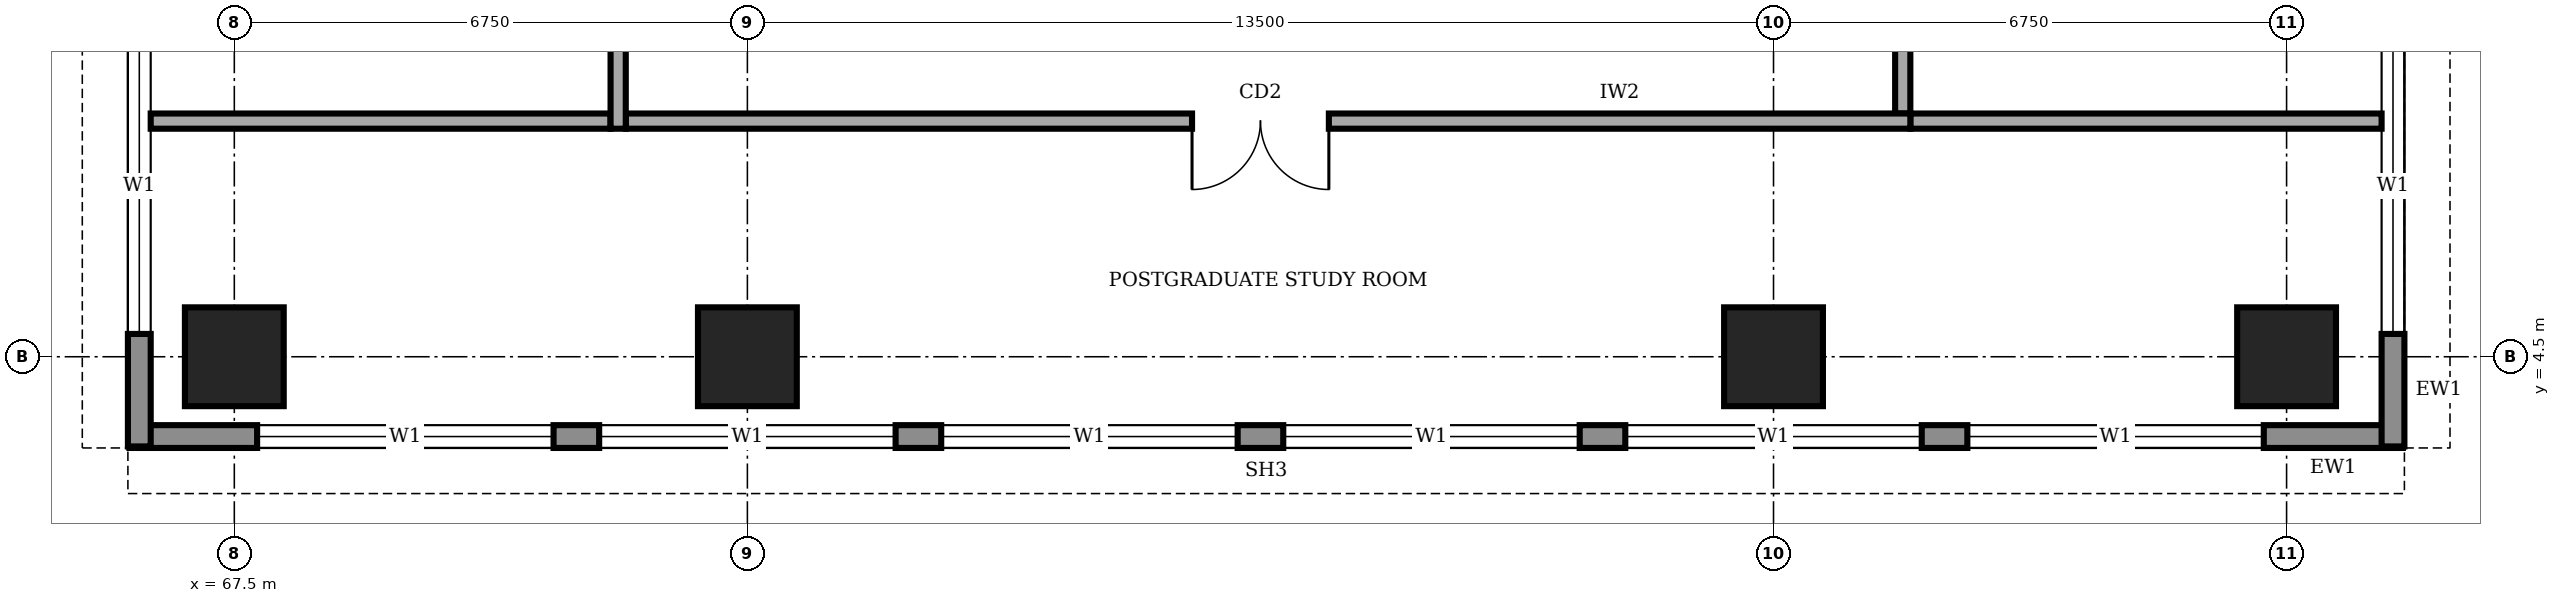
"""IFC4 building model, lengths in metres.
Left out: names, types, materials, properties, quantities, classifications, styles, units other than length and angle.
Written with IfcOpenShell. Run it as: python <this file> out.ifc"""

import sys

from ifc_helpers import new_model, si_unit, direction, frame, frame_2d, origin, origin_2d, place, context, subcontext, project, spatial, rectangle, extrude, element, fill, save


model = new_model("IFC4")
c1 = context("Model", 3, precision=1e-05, world=origin(), true_north=direction((0.0, 1.0)))
c2 = subcontext(c1, "Body", "Model", "MODEL_VIEW")
j1 = project(units=[si_unit("LENGTHUNIT", "METRE"), si_unit("PLANEANGLEUNIT", "RADIAN")], contexts=[c1])
p1 = place(None, origin())
s1 = spatial("IfcSite", under=j1, at=p1, CompositionType="ELEMENT")
p2 = place(p1, origin())
s2 = spatial("IfcBuilding", under=s1, at=p2, CompositionType="ELEMENT")
p3 = place(p2, frame((0.0, 0.0, 205.0)))
s3 = spatial("IfcBuildingStorey", under=s2, at=p3, CompositionType="ELEMENT", Elevation=205.0)
for number, where, z_axis, x_axis in (
    (1, (67.5, 4.5, 0.0), (0.0, 0.0, 1.0), (1.0, 0.0, 0.0)),
    (2, (74.25, 4.5, 0.0), (0.0, 0.0, 1.0), (1.0, 0.0, 0.0)),
    (3, (87.75, 4.5, 0.0), (0.0, 0.0, 1.0), (1.0, 0.0, 0.0)),
    (4, (94.5, 4.5, 0.0), (0.0, 0.0, 1.0), (1.0, 0.0, 0.0)),
):
    element("IfcColumn", number, at=place(p3, frame(where, z_axis=z_axis, x_axis=x_axis)), inside=s3, PredefinedType="COLUMN", context=c2, shape_type="SweptSolid", body=[
        extrude(rectangle(XDim=1.3, YDim=1.3, at=origin_2d()), origin(), (0.0, 0.0, 1.0), 4.0),
    ])
p4 = place(p3, frame((66.12, 3.45, 0.0), z_axis=(0.0, 0.0, 1.0), x_axis=(1.0, 0.0, 0.0)))
e5 = element("IfcWall", 5, at=p4, inside=s3, PredefinedType="STANDARD", context=c2, shape_type="SweptSolid", body=[
    extrude(rectangle(XDim=29.91, YDim=0.3, at=frame_2d((14.955, 0.0))), origin(), (0.0, 0.0, 1.0), 3.75),
])
p5 = place(p4, frame((1.68, 0.0, 0.9)))
e6 = element("IfcOpeningElement", 6, at=p5, cuts=e5, PredefinedType="OPENING", context=c2, shape_type="SweptSolid", body=[
    extrude(rectangle(XDim=3.9, YDim=2.2, at=frame_2d((1.95, 1.1))), frame((0.0, 0.16, 0.0), z_axis=(0.0, -1.0, 0.0), x_axis=(1.0, 0.0, 0.0)), (0.0, 0.0, 1.0), 0.32),
])
p6 = place(p4, frame((6.18, 0.0, 0.9)))
e7 = element("IfcOpeningElement", 7, at=p6, cuts=e5, PredefinedType="OPENING", context=c2, shape_type="SweptSolid", body=[
    extrude(rectangle(XDim=3.9, YDim=2.2, at=frame_2d((1.95, 1.1))), frame((0.0, 0.16, 0.0), z_axis=(0.0, -1.0, 0.0), x_axis=(1.0, 0.0, 0.0)), (0.0, 0.0, 1.0), 0.32),
])
p7 = place(p4, frame((10.68, 0.0, 0.9)))
e8 = element("IfcOpeningElement", 8, at=p7, cuts=e5, PredefinedType="OPENING", context=c2, shape_type="SweptSolid", body=[
    extrude(rectangle(XDim=3.9, YDim=2.2, at=frame_2d((1.95, 1.1))), frame((0.0, 0.16, 0.0), z_axis=(0.0, -1.0, 0.0), x_axis=(1.0, 0.0, 0.0)), (0.0, 0.0, 1.0), 0.32),
])
p8 = place(p4, frame((15.18, 0.0, 0.9)))
e9 = element("IfcOpeningElement", 9, at=p8, cuts=e5, PredefinedType="OPENING", context=c2, shape_type="SweptSolid", body=[
    extrude(rectangle(XDim=3.9, YDim=2.2, at=frame_2d((1.95, 1.1))), frame((0.0, 0.16, 0.0), z_axis=(0.0, -1.0, 0.0), x_axis=(1.0, 0.0, 0.0)), (0.0, 0.0, 1.0), 0.32),
])
p9 = place(p4, frame((19.68, 0.0, 0.9)))
e10 = element("IfcOpeningElement", 10, at=p9, cuts=e5, PredefinedType="OPENING", context=c2, shape_type="SweptSolid", body=[
    extrude(rectangle(XDim=3.9, YDim=2.2, at=frame_2d((1.95, 1.1))), frame((0.0, 0.16, 0.0), z_axis=(0.0, -1.0, 0.0), x_axis=(1.0, 0.0, 0.0)), (0.0, 0.0, 1.0), 0.32),
])
p10 = place(p4, frame((24.18, 0.0, 0.9)))
e11 = element("IfcOpeningElement", 11, at=p10, cuts=e5, PredefinedType="OPENING", context=c2, shape_type="SweptSolid", body=[
    extrude(rectangle(XDim=3.9, YDim=2.2, at=frame_2d((1.95, 1.1))), frame((0.0, 0.16, 0.0), z_axis=(0.0, -1.0, 0.0), x_axis=(1.0, 0.0, 0.0)), (0.0, 0.0, 1.0), 0.32),
])
p11 = place(p3, frame((95.9, 3.32, 0.0), z_axis=(0.0, 0.0, 1.0), x_axis=(0.0, 1.0, 0.0)))
e12 = element("IfcWall", 12, at=p11, inside=s3, PredefinedType="STANDARD", context=c2, shape_type="SweptSolid", body=[
    extrude(rectangle(XDim=33.86, YDim=0.3, at=frame_2d((16.93, 0.0))), origin(), (0.0, 0.0, 1.0), 3.75),
])
p12 = place(p11, frame((1.48, 0.0, 0.9)))
e13 = element("IfcOpeningElement", 13, at=p12, cuts=e12, PredefinedType="OPENING", context=c2, shape_type="SweptSolid", body=[
    extrude(rectangle(XDim=3.9, YDim=2.2, at=frame_2d((1.95, 1.1))), frame((0.0, 0.16, 0.0), z_axis=(0.0, -1.0, 0.0), x_axis=(1.0, 0.0, 0.0)), (0.0, 0.0, 1.0), 0.32),
])
p13 = place(p11, frame((5.98, 0.0, 0.9)))
e14 = element("IfcOpeningElement", 14, at=p13, cuts=e12, PredefinedType="OPENING", context=c2, shape_type="SweptSolid", body=[
    extrude(rectangle(XDim=3.9, YDim=2.2, at=frame_2d((1.95, 1.1))), frame((0.0, 0.16, 0.0), z_axis=(0.0, -1.0, 0.0), x_axis=(1.0, 0.0, 0.0)), (0.0, 0.0, 1.0), 0.32),
])
p14 = place(p11, frame((10.48, 0.0, 0.9)))
e15 = element("IfcOpeningElement", 15, at=p14, cuts=e12, PredefinedType="OPENING", context=c2, shape_type="SweptSolid", body=[
    extrude(rectangle(XDim=3.9, YDim=2.2, at=frame_2d((1.95, 1.1))), frame((0.0, 0.16, 0.0), z_axis=(0.0, -1.0, 0.0), x_axis=(1.0, 0.0, 0.0)), (0.0, 0.0, 1.0), 0.32),
])
p15 = place(p11, frame((14.98, 0.0, 0.9)))
e16 = element("IfcOpeningElement", 16, at=p15, cuts=e12, PredefinedType="OPENING", context=c2, shape_type="SweptSolid", body=[
    extrude(rectangle(XDim=3.9, YDim=2.2, at=frame_2d((1.95, 1.1))), frame((0.0, 0.16, 0.0), z_axis=(0.0, -1.0, 0.0), x_axis=(1.0, 0.0, 0.0)), (0.0, 0.0, 1.0), 0.32),
])
p16 = place(p11, frame((19.48, 0.0, 0.9)))
e17 = element("IfcOpeningElement", 17, at=p16, cuts=e12, PredefinedType="OPENING", context=c2, shape_type="SweptSolid", body=[
    extrude(rectangle(XDim=3.9, YDim=2.2, at=frame_2d((1.95, 1.1))), frame((0.0, 0.16, 0.0), z_axis=(0.0, -1.0, 0.0), x_axis=(1.0, 0.0, 0.0)), (0.0, 0.0, 1.0), 0.32),
])
p17 = place(p11, frame((23.98, 0.0, 0.9)))
e18 = element("IfcOpeningElement", 18, at=p17, cuts=e12, PredefinedType="OPENING", context=c2, shape_type="SweptSolid", body=[
    extrude(rectangle(XDim=3.9, YDim=2.2, at=frame_2d((1.95, 1.1))), frame((0.0, 0.16, 0.0), z_axis=(0.0, -1.0, 0.0), x_axis=(1.0, 0.0, 0.0)), (0.0, 0.0, 1.0), 0.32),
])
p18 = place(p11, frame((28.48, 0.0, 0.9)))
e19 = element("IfcOpeningElement", 19, at=p18, cuts=e12, PredefinedType="OPENING", context=c2, shape_type="SweptSolid", body=[
    extrude(rectangle(XDim=3.9, YDim=2.2, at=frame_2d((1.95, 1.1))), frame((0.0, 0.16, 0.0), z_axis=(0.0, -1.0, 0.0), x_axis=(1.0, 0.0, 0.0)), (0.0, 0.0, 1.0), 0.32),
])
p19 = place(p3, frame((66.25, 37.18, 0.0), z_axis=(0.0, 0.0, 1.0), x_axis=(0.0, -1.0, 0.0)))
e20 = element("IfcWall", 20, at=p19, inside=s3, PredefinedType="STANDARD", context=c2, shape_type="SweptSolid", body=[
    extrude(rectangle(XDim=33.86, YDim=0.3, at=frame_2d((16.93, 0.0))), origin(), (0.0, 0.0, 1.0), 3.75),
])
p20 = place(p19, frame((28.48, 0.0, 0.9)))
e21 = element("IfcOpeningElement", 21, at=p20, cuts=e20, PredefinedType="OPENING", context=c2, shape_type="SweptSolid", body=[
    extrude(rectangle(XDim=3.9, YDim=2.2, at=frame_2d((1.95, 1.1))), frame((0.0, 0.16, 0.0), z_axis=(0.0, -1.0, 0.0), x_axis=(1.0, 0.0, 0.0)), (0.0, 0.0, 1.0), 0.32),
])
p21 = place(p19, frame((23.98, 0.0, 0.9)))
e22 = element("IfcOpeningElement", 22, at=p21, cuts=e20, PredefinedType="OPENING", context=c2, shape_type="SweptSolid", body=[
    extrude(rectangle(XDim=3.9, YDim=2.2, at=frame_2d((1.95, 1.1))), frame((0.0, 0.16, 0.0), z_axis=(0.0, -1.0, 0.0), x_axis=(1.0, 0.0, 0.0)), (0.0, 0.0, 1.0), 0.32),
])
p22 = place(p19, frame((19.48, 0.0, 0.9)))
e23 = element("IfcOpeningElement", 23, at=p22, cuts=e20, PredefinedType="OPENING", context=c2, shape_type="SweptSolid", body=[
    extrude(rectangle(XDim=3.9, YDim=2.2, at=frame_2d((1.95, 1.1))), frame((0.0, 0.16, 0.0), z_axis=(0.0, -1.0, 0.0), x_axis=(1.0, 0.0, 0.0)), (0.0, 0.0, 1.0), 0.32),
])
p23 = place(p19, frame((14.98, 0.0, 0.9)))
e24 = element("IfcOpeningElement", 24, at=p23, cuts=e20, PredefinedType="OPENING", context=c2, shape_type="SweptSolid", body=[
    extrude(rectangle(XDim=3.9, YDim=2.2, at=frame_2d((1.95, 1.1))), frame((0.0, 0.16, 0.0), z_axis=(0.0, -1.0, 0.0), x_axis=(1.0, 0.0, 0.0)), (0.0, 0.0, 1.0), 0.32),
])
p24 = place(p19, frame((10.48, 0.0, 0.9)))
e25 = element("IfcOpeningElement", 25, at=p24, cuts=e20, PredefinedType="OPENING", context=c2, shape_type="SweptSolid", body=[
    extrude(rectangle(XDim=3.9, YDim=2.2, at=frame_2d((1.95, 1.1))), frame((0.0, 0.16, 0.0), z_axis=(0.0, -1.0, 0.0), x_axis=(1.0, 0.0, 0.0)), (0.0, 0.0, 1.0), 0.32),
])
p25 = place(p19, frame((5.98, 0.0, 0.9)))
e26 = element("IfcOpeningElement", 26, at=p25, cuts=e20, PredefinedType="OPENING", context=c2, shape_type="SweptSolid", body=[
    extrude(rectangle(XDim=3.9, YDim=2.2, at=frame_2d((1.95, 1.1))), frame((0.0, 0.16, 0.0), z_axis=(0.0, -1.0, 0.0), x_axis=(1.0, 0.0, 0.0)), (0.0, 0.0, 1.0), 0.32),
])
p26 = place(p19, frame((1.48, 0.0, 0.9)))
e27 = element("IfcOpeningElement", 27, at=p26, cuts=e20, PredefinedType="OPENING", context=c2, shape_type="SweptSolid", body=[
    extrude(rectangle(XDim=3.9, YDim=2.2, at=frame_2d((1.95, 1.1))), frame((0.0, 0.16, 0.0), z_axis=(0.0, -1.0, 0.0), x_axis=(1.0, 0.0, 0.0)), (0.0, 0.0, 1.0), 0.32),
])
p27 = place(p3, frame((72.65, 7.6, 0.0), z_axis=(0.0, 0.0, 1.0), x_axis=(1.0, 0.0, 0.0)))
e28 = element("IfcWall", 28, at=p27, inside=s3, PredefinedType="SOLIDWALL", context=c2, shape_type="SweptSolid", body=[
    extrude(rectangle(XDim=16.9, YDim=0.2, at=frame_2d((8.45, 0.0))), origin(), (0.0, 0.0, 1.0), 3.75),
])
p28 = place(p27, frame((7.45, 0.0, 0.0)))
e29 = element("IfcOpeningElement", 29, at=p28, cuts=e28, PredefinedType="OPENING", context=c2, shape_type="SweptSolid", body=[
    extrude(rectangle(XDim=1.8, YDim=2.1, at=frame_2d((0.9, 1.05))), frame((0.0, 0.11, 0.0), z_axis=(0.0, -1.0, 0.0), x_axis=(1.0, 0.0, 0.0)), (0.0, 0.0, 1.0), 0.22),
])
p29 = place(p3, frame((89.45, 7.7, 0.0), z_axis=(0.0, 0.0, 1.0), x_axis=(0.0, 1.0, 0.0)))
e30 = element("IfcWall", 30, at=p29, inside=s3, PredefinedType="SOLIDWALL", context=c2, shape_type="SweptSolid", body=[
    extrude(rectangle(XDim=23.8, YDim=0.2, at=frame_2d((11.9, 0.0))), origin(), (0.0, 0.0, 1.0), 3.75),
])
p30 = place(p29, frame((2.3, 0.0, 0.0)))
e31 = element("IfcOpeningElement", 31, at=p30, cuts=e30, PredefinedType="OPENING", context=c2, shape_type="SweptSolid", body=[
    extrude(rectangle(XDim=1.0, YDim=2.1, at=frame_2d((0.5, 1.05))), frame((0.0, 0.11, 0.0), z_axis=(0.0, -1.0, 0.0), x_axis=(1.0, 0.0, 0.0)), (0.0, 0.0, 1.0), 0.22),
])
p31 = place(p29, frame((6.55, 0.0, 0.0)))
e32 = element("IfcOpeningElement", 32, at=p31, cuts=e30, PredefinedType="OPENING", context=c2, shape_type="SweptSolid", body=[
    extrude(rectangle(XDim=0.9, YDim=2.1, at=frame_2d((0.45, 1.05))), frame((0.0, 0.11, 0.0), z_axis=(0.0, -1.0, 0.0), x_axis=(1.0, 0.0, 0.0)), (0.0, 0.0, 1.0), 0.22),
])
p32 = place(p29, frame((9.75, 0.0, 0.0)))
e33 = element("IfcOpeningElement", 33, at=p32, cuts=e30, PredefinedType="OPENING", context=c2, shape_type="SweptSolid", body=[
    extrude(rectangle(XDim=0.9, YDim=2.1, at=frame_2d((0.45, 1.05))), frame((0.0, 0.11, 0.0), z_axis=(0.0, -1.0, 0.0), x_axis=(1.0, 0.0, 0.0)), (0.0, 0.0, 1.0), 0.22),
])
p33 = place(p29, frame((15.3, 0.0, 0.0)))
e34 = element("IfcOpeningElement", 34, at=p33, cuts=e30, PredefinedType="OPENING", context=c2, shape_type="SweptSolid", body=[
    extrude(rectangle(XDim=0.9, YDim=2.1, at=frame_2d((0.45, 1.05))), frame((0.0, 0.11, 0.0), z_axis=(0.0, -1.0, 0.0), x_axis=(1.0, 0.0, 0.0)), (0.0, 0.0, 1.0), 0.22),
])
p34 = place(p29, frame((17.8, 0.0, 0.0)))
e35 = element("IfcOpeningElement", 35, at=p34, cuts=e30, PredefinedType="OPENING", context=c2, shape_type="SweptSolid", body=[
    extrude(rectangle(XDim=1.0, YDim=2.1, at=frame_2d((0.5, 1.05))), frame((0.0, 0.11, 0.0), z_axis=(0.0, -1.0, 0.0), x_axis=(1.0, 0.0, 0.0)), (0.0, 0.0, 1.0), 0.22),
])
p35 = place(p29, frame((12.7, 0.0, 0.0)))
e36 = element("IfcOpeningElement", 36, at=p35, cuts=e30, PredefinedType="OPENING", context=c2, shape_type="SweptSolid", body=[
    extrude(rectangle(XDim=1.0, YDim=2.1, at=frame_2d((0.5, 1.05))), frame((0.0, 0.11, 0.0), z_axis=(0.0, -1.0, 0.0), x_axis=(1.0, 0.0, 0.0)), (0.0, 0.0, 1.0), 0.22),
])
p36 = place(p29, frame((21.05, 0.0, 0.0)))
e37 = element("IfcOpeningElement", 37, at=p36, cuts=e30, PredefinedType="OPENING", context=c2, shape_type="SweptSolid", body=[
    extrude(rectangle(XDim=1.0, YDim=2.1, at=frame_2d((0.5, 1.05))), frame((0.0, 0.11, 0.0), z_axis=(0.0, -1.0, 0.0), x_axis=(1.0, 0.0, 0.0)), (0.0, 0.0, 1.0), 0.22),
])
p37 = place(p3, frame((72.55, 31.3, 0.0), z_axis=(0.0, 0.0, 1.0), x_axis=(0.0, -1.0, 0.0)))
e38 = element("IfcWall", 38, at=p37, inside=s3, PredefinedType="SOLIDWALL", context=c2, shape_type="SweptSolid", body=[
    extrude(rectangle(XDim=23.8, YDim=0.2, at=frame_2d((11.9, 0.0))), origin(), (0.0, 0.0, 1.0), 3.75),
])
p38 = place(p37, frame((18.05, 0.0, 0.0)))
e39 = element("IfcOpeningElement", 39, at=p38, cuts=e38, PredefinedType="OPENING", context=c2, shape_type="SweptSolid", body=[
    extrude(rectangle(XDim=1.0, YDim=2.1, at=frame_2d((0.5, 1.05))), frame((0.0, 0.11, 0.0), z_axis=(0.0, -1.0, 0.0), x_axis=(1.0, 0.0, 0.0)), (0.0, 0.0, 1.0), 0.22),
])
p39 = place(p37, frame((6.05, 0.0, 0.0)))
e40 = element("IfcOpeningElement", 40, at=p39, cuts=e38, PredefinedType="OPENING", context=c2, shape_type="SweptSolid", body=[
    extrude(rectangle(XDim=1.0, YDim=2.1, at=frame_2d((0.5, 1.05))), frame((0.0, 0.11, 0.0), z_axis=(0.0, -1.0, 0.0), x_axis=(1.0, 0.0, 0.0)), (0.0, 0.0, 1.0), 0.22),
])
p40 = place(p3, frame((66.4, 7.6, 0.0), z_axis=(0.0, 0.0, 1.0), x_axis=(1.0, 0.0, 0.0)))
e41 = element("IfcWall", 41, at=p40, inside=s3, PredefinedType="SOLIDWALL", context=c2, shape_type="SweptSolid", body=[
    extrude(rectangle(XDim=6.05, YDim=0.2, at=frame_2d((3.025, 0.0))), origin(), (0.0, 0.0, 1.0), 3.75),
])
p41 = place(p3, frame((89.55, 7.6, 0.0), z_axis=(0.0, 0.0, 1.0), x_axis=(1.0, 0.0, 0.0)))
e42 = element("IfcWall", 42, at=p41, inside=s3, PredefinedType="SOLIDWALL", context=c2, shape_type="SweptSolid", body=[
    extrude(rectangle(XDim=6.2, YDim=0.2, at=frame_2d((3.1, 0.0))), origin(), (0.0, 0.0, 1.0), 3.75),
])
p42 = place(p5, origin())
e43 = element("IfcWindow", 43, at=p42, inside=s3, PartitioningType="SINGLE_PANEL", PredefinedType="WINDOW", context=c2, shape_type="SweptSolid", body=[
    extrude(rectangle(XDim=3.9, YDim=2.2, at=frame_2d((1.95, 1.1))), frame((0.0, 0.03, 0.0), z_axis=(0.0, -1.0, 0.0), x_axis=(1.0, 0.0, 0.0)), (0.0, 0.0, 1.0), 0.06),
])
fill(e6, e43)
p43 = place(p6, origin())
e44 = element("IfcWindow", 44, at=p43, inside=s3, PartitioningType="SINGLE_PANEL", PredefinedType="WINDOW", context=c2, shape_type="SweptSolid", body=[
    extrude(rectangle(XDim=3.9, YDim=2.2, at=frame_2d((1.95, 1.1))), frame((0.0, 0.03, 0.0), z_axis=(0.0, -1.0, 0.0), x_axis=(1.0, 0.0, 0.0)), (0.0, 0.0, 1.0), 0.06),
])
fill(e7, e44)
p44 = place(p7, origin())
e45 = element("IfcWindow", 45, at=p44, inside=s3, PartitioningType="SINGLE_PANEL", PredefinedType="WINDOW", context=c2, shape_type="SweptSolid", body=[
    extrude(rectangle(XDim=3.9, YDim=2.2, at=frame_2d((1.95, 1.1))), frame((0.0, 0.03, 0.0), z_axis=(0.0, -1.0, 0.0), x_axis=(1.0, 0.0, 0.0)), (0.0, 0.0, 1.0), 0.06),
])
fill(e8, e45)
p45 = place(p8, origin())
e46 = element("IfcWindow", 46, at=p45, inside=s3, PartitioningType="SINGLE_PANEL", PredefinedType="WINDOW", context=c2, shape_type="SweptSolid", body=[
    extrude(rectangle(XDim=3.9, YDim=2.2, at=frame_2d((1.95, 1.1))), frame((0.0, 0.03, 0.0), z_axis=(0.0, -1.0, 0.0), x_axis=(1.0, 0.0, 0.0)), (0.0, 0.0, 1.0), 0.06),
])
fill(e9, e46)
p46 = place(p9, origin())
e47 = element("IfcWindow", 47, at=p46, inside=s3, PartitioningType="SINGLE_PANEL", PredefinedType="WINDOW", context=c2, shape_type="SweptSolid", body=[
    extrude(rectangle(XDim=3.9, YDim=2.2, at=frame_2d((1.95, 1.1))), frame((0.0, 0.03, 0.0), z_axis=(0.0, -1.0, 0.0), x_axis=(1.0, 0.0, 0.0)), (0.0, 0.0, 1.0), 0.06),
])
fill(e10, e47)
p47 = place(p10, origin())
e48 = element("IfcWindow", 48, at=p47, inside=s3, PartitioningType="SINGLE_PANEL", PredefinedType="WINDOW", context=c2, shape_type="SweptSolid", body=[
    extrude(rectangle(XDim=3.9, YDim=2.2, at=frame_2d((1.95, 1.1))), frame((0.0, 0.03, 0.0), z_axis=(0.0, -1.0, 0.0), x_axis=(1.0, 0.0, 0.0)), (0.0, 0.0, 1.0), 0.06),
])
fill(e11, e48)
p48 = place(p12, origin())
e49 = element("IfcWindow", 49, at=p48, inside=s3, PartitioningType="SINGLE_PANEL", PredefinedType="WINDOW", context=c2, shape_type="SweptSolid", body=[
    extrude(rectangle(XDim=3.9, YDim=2.2, at=frame_2d((1.95, 1.1))), frame((0.0, 0.03, 0.0), z_axis=(0.0, -1.0, 0.0), x_axis=(1.0, 0.0, 0.0)), (0.0, 0.0, 1.0), 0.06),
])
fill(e13, e49)
p49 = place(p20, origin())
e50 = element("IfcWindow", 50, at=p49, inside=s3, PartitioningType="SINGLE_PANEL", PredefinedType="WINDOW", context=c2, shape_type="SweptSolid", body=[
    extrude(rectangle(XDim=3.9, YDim=2.2, at=frame_2d((1.95, 1.1))), frame((0.0, 0.03, 0.0), z_axis=(0.0, -1.0, 0.0), x_axis=(1.0, 0.0, 0.0)), (0.0, 0.0, 1.0), 0.06),
])
fill(e21, e50)
p50 = place(p28, frame((1.8, 0.0, 0.0), z_axis=(0.0, 0.0, 1.0), x_axis=(-1.0, 0.0, 0.0)))
e51 = element("IfcDoor", 51, at=p50, inside=s3, OperationType="DOUBLE_DOOR_SINGLE_SWING", PredefinedType="DOOR", context=c2, shape_type="SweptSolid", body=[
    extrude(rectangle(XDim=1.8, YDim=2.1, at=frame_2d((0.9, 1.05))), frame((0.0, 0.025, 0.0), z_axis=(0.0, -1.0, 0.0), x_axis=(1.0, 0.0, 0.0)), (0.0, 0.0, 1.0), 0.05),
])
fill(e29, e51)
save(model, sys.argv[1])
